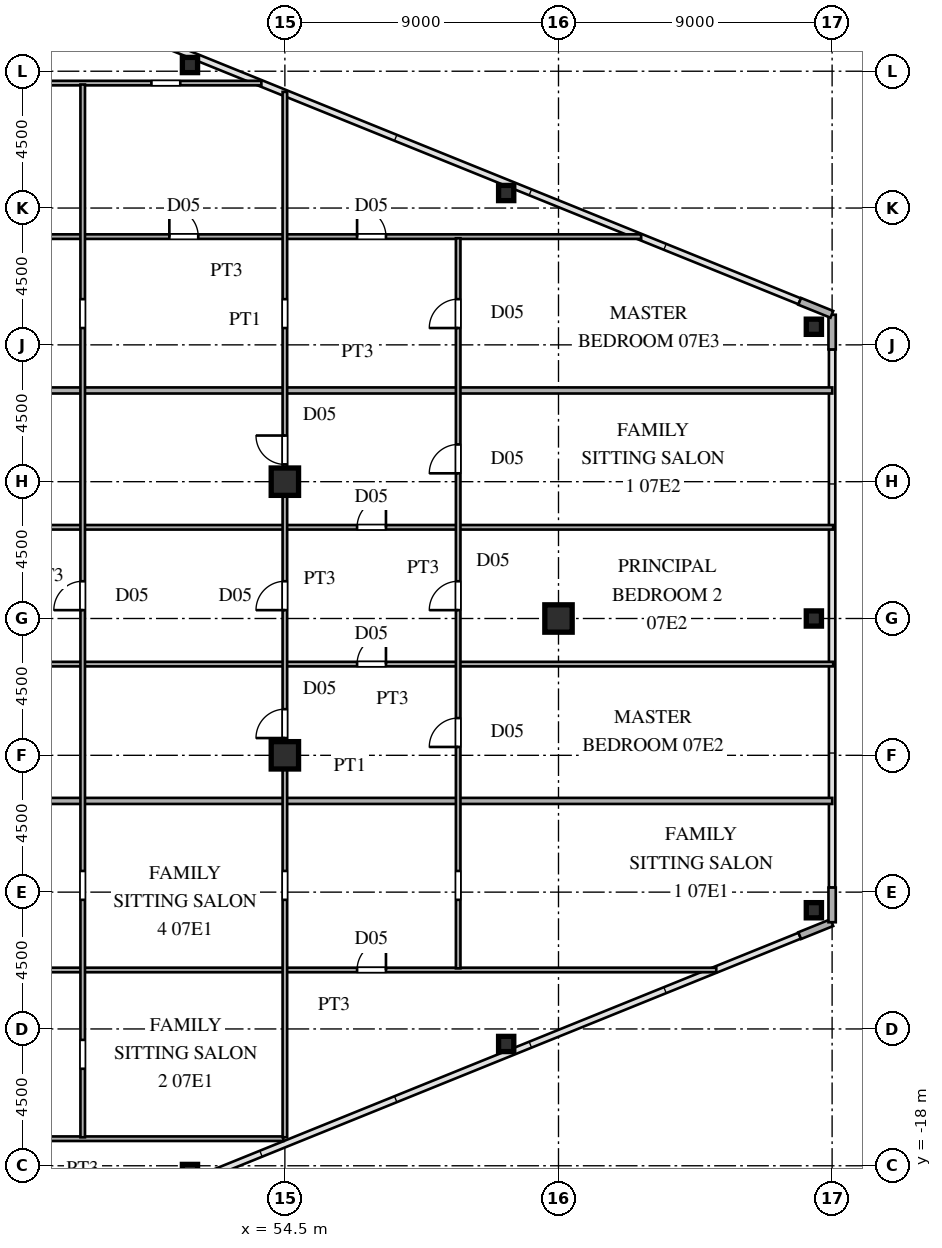
"""IFC4 building model, lengths in metres.
Left out: names, types, materials, properties, quantities, classifications, styles, units other than length and angle.
Written with IfcOpenShell. Run it as: python <this file> out.ifc"""

import sys

from ifc_helpers import new_model, si_unit, direction, frame, frame_2d, origin, origin_2d, place, context, subcontext, project, spatial, rectangle, hollow_rectangle, i_section, extrude, source, transform, mapped, element, fill, save


model = new_model("IFC4")
c1 = context("Model", 3, precision=1e-05, world=origin(), true_north=direction((0.0, 1.0)))
c2 = subcontext(c1, "Body", "Model", "MODEL_VIEW")
j1 = project(units=[si_unit("LENGTHUNIT", "METRE"), si_unit("PLANEANGLEUNIT", "RADIAN")], contexts=[c1])
p1 = place(None, origin())
s1 = spatial("IfcSite", under=j1, at=p1, CompositionType="ELEMENT")
p2 = place(p1, origin())
s2 = spatial("IfcBuilding", under=s1, at=p2, CompositionType="ELEMENT")
p3 = place(p2, frame((0.0, 0.0, 29.7)))
s3 = spatial("IfcBuildingStorey", under=s2, at=p3, CompositionType="ELEMENT", Elevation=29.7)
m1 = source(origin(), c2, "Body", "SweptSolid", [
    extrude(i_section(OverallWidth=0.9, OverallDepth=0.9, WebThickness=0.036, FlangeThickness=0.055, at=origin_2d()), origin(), (0.0, 0.0, 1.0), 3.6),
])
for number, where, z_axis, x_axis in (
    (1, (54.5, -4.5, 0.0), (0.0, 0.0, 1.0), (1.0, 0.0, 0.0)),
    (2, (54.5, 4.5, 0.0), (0.0, 0.0, 1.0), (1.0, 0.0, 0.0)),
    (3, (63.5, 0.0, 0.0), (0.0, 0.0, 1.0), (1.0, 0.0, 0.0)),
):
    element("IfcColumn", number, at=place(p3, frame(where, z_axis=z_axis, x_axis=x_axis)), inside=s3, PredefinedType="COLUMN", context=c2, shape_type="MappedRepresentation", body=[
        mapped(m1, transform((0.0, 0.0, 0.0), scale=1.0)),
    ])
m2 = source(origin(), c2, "Body", "SweptSolid", [
    extrude(hollow_rectangle(XDim=0.5, YDim=0.5, WallThickness=0.02, at=origin_2d()), origin(), (0.0, 0.0, 1.0), 3.6),
])
for number, where, z_axis, x_axis in (
    (4, (71.9, -9.596, 0.0), (0.0, 0.0, 1.0), (1.0, 0.0, 0.0)),
    (5, (71.9, 9.596, 0.0), (0.0, 0.0, 1.0), (1.0, 0.0, 0.0)),
    (6, (51.378, -18.204, 0.0), (0.0, 0.0, 1.0), (1.0, 0.0, 0.0)),
    (7, (61.779, -13.994, 0.0), (0.0, 0.0, 1.0), (1.0, 0.0, 0.0)),
    (8, (51.378, 18.204, 0.0), (0.0, 0.0, 1.0), (1.0, 0.0, 0.0)),
    (9, (61.779, 13.994, 0.0), (0.0, 0.0, 1.0), (1.0, 0.0, 0.0)),
    (10, (71.9, 0.0, 0.0), (0.0, 0.0, 1.0), (1.0, 0.0, 0.0)),
):
    element("IfcColumn", number, at=place(p3, frame(where, z_axis=z_axis, x_axis=x_axis)), inside=s3, PredefinedType="COLUMN", context=c2, shape_type="MappedRepresentation", body=[
        mapped(m2, transform((0.0, 0.0, 0.0), scale=1.0)),
    ])
for number, where, z_axis, x_axis in (
    (11, (71.434, -10.431, 0.0), (0.0, 0.0, 1.0), (0.927, 0.375, 0.0)),
    (12, (72.5, -9.99, 0.0), (0.0, 0.0, 1.0), (0.0, 1.0, 0.0)),
    (13, (72.5, 8.85, 0.0), (0.0, 0.0, 1.0), (0.0, 1.0, 0.0)),
    (14, (72.491, 10.004, 0.0), (0.0, 0.0, 1.0), (-0.927, 0.375, 0.0)),
):
    element("IfcWall", number, at=place(p3, frame(where, z_axis=z_axis, x_axis=x_axis)), inside=s3, PredefinedType="SOLIDWALL", context=c2, shape_type="SweptSolid", body=[
        extrude(rectangle(XDim=1.14, YDim=0.24, at=frame_2d((0.57, 0.0))), origin(), (0.0, 0.0, 1.0), 3.38),
    ])
p4 = place(p3, frame((41.25, -17.11, 0.0), z_axis=(0.0, 0.0, 1.0), x_axis=(1.0, 0.0, 0.0)))
e15 = element("IfcWall", 15, at=p4, inside=s3, PredefinedType="PARTITIONING", context=c2, shape_type="SweptSolid", body=[
    extrude(rectangle(XDim=13.2, YDim=0.15, at=frame_2d((6.6, 0.0))), origin(), (0.0, 0.0, 1.0), 3.38),
])
p5 = place(p4, frame((2.8, 0.0, 0.0)))
e16 = element("IfcOpeningElement", 16, at=p5, cuts=e15, PredefinedType="OPENING", context=c2, shape_type="SweptSolid", body=[
    extrude(rectangle(XDim=0.95, YDim=2.15, at=frame_2d((0.475, 1.075))), frame((0.0, 0.085, 0.0), z_axis=(0.0, -1.0, 0.0), x_axis=(1.0, 0.0, 0.0)), (0.0, 0.0, 1.0), 0.17),
])
p6 = place(p3, frame((41.25, -11.56, 0.0), z_axis=(0.0, 0.0, 1.0), x_axis=(1.0, 0.0, 0.0)))
e17 = element("IfcWall", 17, at=p6, inside=s3, PredefinedType="PARTITIONING", context=c2, shape_type="SweptSolid", body=[
    extrude(rectangle(XDim=27.44, YDim=0.15, at=frame_2d((13.72, 0.0))), origin(), (0.0, 0.0, 1.0), 3.38),
])
p7 = place(p6, frame((2.8, 0.0, 0.0)))
e18 = element("IfcOpeningElement", 18, at=p7, cuts=e17, PredefinedType="OPENING", context=c2, shape_type="SweptSolid", body=[
    extrude(rectangle(XDim=0.95, YDim=2.15, at=frame_2d((0.475, 1.075))), frame((0.0, 0.085, 0.0), z_axis=(0.0, -1.0, 0.0), x_axis=(1.0, 0.0, 0.0)), (0.0, 0.0, 1.0), 0.17),
])
p8 = place(p6, frame((15.625, 0.0, 0.0)))
e19 = element("IfcOpeningElement", 19, at=p8, cuts=e17, PredefinedType="OPENING", context=c2, shape_type="SweptSolid", body=[
    extrude(rectangle(XDim=0.95, YDim=2.15, at=frame_2d((0.475, 1.075))), frame((0.0, 0.085, 0.0), z_axis=(0.0, -1.0, 0.0), x_axis=(1.0, 0.0, 0.0)), (0.0, 0.0, 1.0), 0.17),
])
p9 = place(p3, frame((38.48, -6.0, 0.0), z_axis=(0.0, 0.0, 1.0), x_axis=(1.0, 0.0, 0.0)))
e20 = element("IfcWall", 20, at=p9, inside=s3, PredefinedType="PARTITIONING", context=c2, shape_type="SweptSolid", body=[
    extrude(rectangle(XDim=34.025, YDim=0.2, at=frame_2d((17.012, 0.0))), origin(), (0.0, 0.0, 1.0), 3.38),
])
p10 = place(p3, frame((41.25, -1.5, 0.0), z_axis=(0.0, 0.0, 1.0), x_axis=(1.0, 0.0, 0.0)))
e21 = element("IfcWall", 21, at=p10, inside=s3, PredefinedType="PARTITIONING", context=c2, shape_type="SweptSolid", body=[
    extrude(rectangle(XDim=31.285, YDim=0.15, at=frame_2d((15.643, 0.0))), origin(), (0.0, 0.0, 1.0), 3.38),
])
p11 = place(p10, frame((2.8, 0.0, 0.0)))
e22 = element("IfcOpeningElement", 22, at=p11, cuts=e21, PredefinedType="OPENING", context=c2, shape_type="SweptSolid", body=[
    extrude(rectangle(XDim=0.95, YDim=2.15, at=frame_2d((0.475, 1.075))), frame((0.0, 0.085, 0.0), z_axis=(0.0, -1.0, 0.0), x_axis=(1.0, 0.0, 0.0)), (0.0, 0.0, 1.0), 0.17),
])
p12 = place(p10, frame((15.625, 0.0, 0.0)))
e23 = element("IfcOpeningElement", 23, at=p12, cuts=e21, PredefinedType="OPENING", context=c2, shape_type="SweptSolid", body=[
    extrude(rectangle(XDim=0.95, YDim=2.15, at=frame_2d((0.475, 1.075))), frame((0.0, 0.085, 0.0), z_axis=(0.0, -1.0, 0.0), x_axis=(1.0, 0.0, 0.0)), (0.0, 0.0, 1.0), 0.17),
])
p13 = place(p3, frame((41.25, 3.0, 0.0), z_axis=(0.0, 0.0, 1.0), x_axis=(1.0, 0.0, 0.0)))
e24 = element("IfcWall", 24, at=p13, inside=s3, PredefinedType="PARTITIONING", context=c2, shape_type="SweptSolid", body=[
    extrude(rectangle(XDim=31.285, YDim=0.15, at=frame_2d((15.643, 0.0))), origin(), (0.0, 0.0, 1.0), 3.38),
])
p14 = place(p13, frame((2.8, 0.0, 0.0)))
e25 = element("IfcOpeningElement", 25, at=p14, cuts=e24, PredefinedType="OPENING", context=c2, shape_type="SweptSolid", body=[
    extrude(rectangle(XDim=0.95, YDim=2.15, at=frame_2d((0.475, 1.075))), frame((0.0, 0.085, 0.0), z_axis=(0.0, -1.0, 0.0), x_axis=(1.0, 0.0, 0.0)), (0.0, 0.0, 1.0), 0.17),
])
p15 = place(p13, frame((15.625, 0.0, 0.0)))
e26 = element("IfcOpeningElement", 26, at=p15, cuts=e24, PredefinedType="OPENING", context=c2, shape_type="SweptSolid", body=[
    extrude(rectangle(XDim=0.95, YDim=2.15, at=frame_2d((0.475, 1.075))), frame((0.0, 0.085, 0.0), z_axis=(0.0, -1.0, 0.0), x_axis=(1.0, 0.0, 0.0)), (0.0, 0.0, 1.0), 0.17),
])
p16 = place(p3, frame((38.48, 7.5, 0.0), z_axis=(0.0, 0.0, 1.0), x_axis=(1.0, 0.0, 0.0)))
e27 = element("IfcWall", 27, at=p16, inside=s3, PredefinedType="PARTITIONING", context=c2, shape_type="SweptSolid", body=[
    extrude(rectangle(XDim=34.025, YDim=0.2, at=frame_2d((17.012, 0.0))), origin(), (0.0, 0.0, 1.0), 3.38),
])
p17 = place(p3, frame((41.25, 12.56, 0.0), z_axis=(0.0, 0.0, 1.0), x_axis=(1.0, 0.0, 0.0)))
e28 = element("IfcWall", 28, at=p17, inside=s3, PredefinedType="PARTITIONING", context=c2, shape_type="SweptSolid", body=[
    extrude(rectangle(XDim=24.969, YDim=0.15, at=frame_2d((12.484, 0.0))), origin(), (0.0, 0.0, 1.0), 3.38),
])
p18 = place(p17, frame((2.8, 0.0, 0.0)))
e29 = element("IfcOpeningElement", 29, at=p18, cuts=e28, PredefinedType="OPENING", context=c2, shape_type="SweptSolid", body=[
    extrude(rectangle(XDim=0.95, YDim=2.15, at=frame_2d((0.475, 1.075))), frame((0.0, 0.085, 0.0), z_axis=(0.0, -1.0, 0.0), x_axis=(1.0, 0.0, 0.0)), (0.0, 0.0, 1.0), 0.17),
])
p19 = place(p17, frame((15.625, 0.0, 0.0)))
e30 = element("IfcOpeningElement", 30, at=p19, cuts=e28, PredefinedType="OPENING", context=c2, shape_type="SweptSolid", body=[
    extrude(rectangle(XDim=0.95, YDim=2.15, at=frame_2d((0.475, 1.075))), frame((0.0, 0.085, 0.0), z_axis=(0.0, -1.0, 0.0), x_axis=(1.0, 0.0, 0.0)), (0.0, 0.0, 1.0), 0.17),
])
p20 = place(p17, frame((9.45, 0.0, 0.0)))
e31 = element("IfcOpeningElement", 31, at=p20, cuts=e28, PredefinedType="OPENING", context=c2, shape_type="SweptSolid", body=[
    extrude(rectangle(XDim=0.95, YDim=2.15, at=frame_2d((0.475, 1.075))), frame((0.0, 0.085, 0.0), z_axis=(0.0, -1.0, 0.0), x_axis=(1.0, 0.0, 0.0)), (0.0, 0.0, 1.0), 0.17),
])
p21 = place(p3, frame((41.25, 17.61, 0.0), z_axis=(0.0, 0.0, 1.0), x_axis=(1.0, 0.0, 0.0)))
e32 = element("IfcWall", 32, at=p21, inside=s3, PredefinedType="PARTITIONING", context=c2, shape_type="SweptSolid", body=[
    extrude(rectangle(XDim=12.477, YDim=0.15, at=frame_2d((6.239, 0.0))), origin(), (0.0, 0.0, 1.0), 3.38),
])
p22 = place(p21, frame((8.86, 0.0, 0.0)))
e33 = element("IfcOpeningElement", 33, at=p22, cuts=e32, PredefinedType="OPENING", context=c2, shape_type="SweptSolid", body=[
    extrude(rectangle(XDim=0.95, YDim=2.15, at=frame_2d((0.475, 1.075))), frame((0.0, 0.085, 0.0), z_axis=(0.0, -1.0, 0.0), x_axis=(1.0, 0.0, 0.0)), (0.0, 0.0, 1.0), 0.17),
])
p23 = place(p3, frame((47.85, -17.063, 0.0), z_axis=(0.0, 0.0, 1.0), x_axis=(0.0, 1.0, 0.0)))
e34 = element("IfcWall", 34, at=p23, inside=s3, PredefinedType="PARTITIONING", context=c2, shape_type="SweptSolid", body=[
    extrude(rectangle(XDim=34.626, YDim=0.15, at=frame_2d((17.313, 0.0))), origin(), (0.0, 0.0, 1.0), 3.38),
])
p24 = place(p23, frame((7.81, 0.0, 0.0)))
e35 = element("IfcOpeningElement", 35, at=p24, cuts=e34, PredefinedType="OPENING", context=c2, shape_type="SweptSolid", body=[
    extrude(rectangle(XDim=0.95, YDim=2.15, at=frame_2d((0.475, 1.075))), frame((0.0, 0.085, 0.0), z_axis=(0.0, -1.0, 0.0), x_axis=(1.0, 0.0, 0.0)), (0.0, 0.0, 1.0), 0.17),
])
p25 = place(p23, frame((2.253, 0.0, 0.0)))
e36 = element("IfcOpeningElement", 36, at=p25, cuts=e34, PredefinedType="OPENING", context=c2, shape_type="SweptSolid", body=[
    extrude(rectangle(XDim=0.95, YDim=2.15, at=frame_2d((0.475, 1.075))), frame((0.0, 0.085, 0.0), z_axis=(0.0, -1.0, 0.0), x_axis=(1.0, 0.0, 0.0)), (0.0, 0.0, 1.0), 0.17),
])
p26 = place(p23, frame((17.338, 0.0, 0.0)))
e37 = element("IfcOpeningElement", 37, at=p26, cuts=e34, PredefinedType="OPENING", context=c2, shape_type="SweptSolid", body=[
    extrude(rectangle(XDim=0.95, YDim=2.15, at=frame_2d((0.475, 1.075))), frame((0.0, 0.085, 0.0), z_axis=(0.0, -1.0, 0.0), x_axis=(1.0, 0.0, 0.0)), (0.0, 0.0, 1.0), 0.17),
])
p27 = place(p23, frame((26.616, 0.0, 0.0)))
e38 = element("IfcOpeningElement", 38, at=p27, cuts=e34, PredefinedType="OPENING", context=c2, shape_type="SweptSolid", body=[
    extrude(rectangle(XDim=0.95, YDim=2.15, at=frame_2d((0.475, 1.075))), frame((0.0, 0.085, 0.0), z_axis=(0.0, -1.0, 0.0), x_axis=(1.0, 0.0, 0.0)), (0.0, 0.0, 1.0), 0.17),
])
p28 = place(p3, frame((54.5, -17.063, 0.0), z_axis=(0.0, 0.0, 1.0), x_axis=(0.0, 1.0, 0.0)))
e39 = element("IfcWall", 39, at=p28, inside=s3, PredefinedType="PARTITIONING", context=c2, shape_type="SweptSolid", body=[
    extrude(rectangle(XDim=34.384, YDim=0.15, at=frame_2d((17.192, 0.0))), origin(), (0.0, 0.0, 1.0), 2.68),
])
p29 = place(p28, frame((7.81, 0.0, 0.0)))
e40 = element("IfcOpeningElement", 40, at=p29, cuts=e39, PredefinedType="OPENING", context=c2, shape_type="SweptSolid", body=[
    extrude(rectangle(XDim=0.95, YDim=2.15, at=frame_2d((0.475, 1.075))), frame((0.0, 0.085, 0.0), z_axis=(0.0, -1.0, 0.0), x_axis=(1.0, 0.0, 0.0)), (0.0, 0.0, 1.0), 0.17),
])
p30 = place(p28, frame((17.338, 0.0, 0.0)))
e41 = element("IfcOpeningElement", 41, at=p30, cuts=e39, PredefinedType="OPENING", context=c2, shape_type="SweptSolid", body=[
    extrude(rectangle(XDim=0.95, YDim=2.15, at=frame_2d((0.475, 1.075))), frame((0.0, 0.085, 0.0), z_axis=(0.0, -1.0, 0.0), x_axis=(1.0, 0.0, 0.0)), (0.0, 0.0, 1.0), 0.17),
])
p31 = place(p28, frame((13.131, 0.0, 0.0)))
e42 = element("IfcOpeningElement", 42, at=p31, cuts=e39, PredefinedType="OPENING", context=c2, shape_type="SweptSolid", body=[
    extrude(rectangle(XDim=0.95, YDim=2.15, at=frame_2d((0.475, 1.075))), frame((0.0, 0.085, 0.0), z_axis=(0.0, -1.0, 0.0), x_axis=(1.0, 0.0, 0.0)), (0.0, 0.0, 1.0), 0.17),
])
p32 = place(p28, frame((22.131, 0.0, 0.0)))
e43 = element("IfcOpeningElement", 43, at=p32, cuts=e39, PredefinedType="OPENING", context=c2, shape_type="SweptSolid", body=[
    extrude(rectangle(XDim=0.95, YDim=2.15, at=frame_2d((0.475, 1.075))), frame((0.0, 0.085, 0.0), z_axis=(0.0, -1.0, 0.0), x_axis=(1.0, 0.0, 0.0)), (0.0, 0.0, 1.0), 0.17),
])
p33 = place(p28, frame((26.616, 0.0, 0.0)))
e44 = element("IfcOpeningElement", 44, at=p33, cuts=e39, PredefinedType="OPENING", context=c2, shape_type="SweptSolid", body=[
    extrude(rectangle(XDim=0.95, YDim=2.15, at=frame_2d((0.475, 1.075))), frame((0.0, 0.085, 0.0), z_axis=(0.0, -1.0, 0.0), x_axis=(1.0, 0.0, 0.0)), (0.0, 0.0, 1.0), 0.17),
])
p34 = place(p3, frame((60.2, -11.506, 0.0), z_axis=(0.0, 0.0, 1.0), x_axis=(0.0, 1.0, 0.0)))
e45 = element("IfcWall", 45, at=p34, inside=s3, PredefinedType="PARTITIONING", context=c2, shape_type="SweptSolid", body=[
    extrude(rectangle(XDim=24.012, YDim=0.15, at=frame_2d((12.006, 0.0))), origin(), (0.0, 0.0, 1.0), 3.38),
])
p35 = place(p34, frame((2.253, 0.0, 0.0)))
e46 = element("IfcOpeningElement", 46, at=p35, cuts=e45, PredefinedType="OPENING", context=c2, shape_type="SweptSolid", body=[
    extrude(rectangle(XDim=0.95, YDim=2.15, at=frame_2d((0.475, 1.075))), frame((0.0, 0.085, 0.0), z_axis=(0.0, -1.0, 0.0), x_axis=(1.0, 0.0, 0.0)), (0.0, 0.0, 1.0), 0.17),
])
p36 = place(p34, frame((7.281, 0.0, 0.0)))
e47 = element("IfcOpeningElement", 47, at=p36, cuts=e45, PredefinedType="OPENING", context=c2, shape_type="SweptSolid", body=[
    extrude(rectangle(XDim=0.95, YDim=2.15, at=frame_2d((0.475, 1.075))), frame((0.0, 0.085, 0.0), z_axis=(0.0, -1.0, 0.0), x_axis=(1.0, 0.0, 0.0)), (0.0, 0.0, 1.0), 0.17),
])
p37 = place(p34, frame((11.781, 0.0, 0.0)))
e48 = element("IfcOpeningElement", 48, at=p37, cuts=e45, PredefinedType="OPENING", context=c2, shape_type="SweptSolid", body=[
    extrude(rectangle(XDim=0.95, YDim=2.15, at=frame_2d((0.475, 1.075))), frame((0.0, 0.085, 0.0), z_axis=(0.0, -1.0, 0.0), x_axis=(1.0, 0.0, 0.0)), (0.0, 0.0, 1.0), 0.17),
])
p38 = place(p34, frame((16.281, 0.0, 0.0)))
e49 = element("IfcOpeningElement", 49, at=p38, cuts=e45, PredefinedType="OPENING", context=c2, shape_type="SweptSolid", body=[
    extrude(rectangle(XDim=0.95, YDim=2.15, at=frame_2d((0.475, 1.075))), frame((0.0, 0.085, 0.0), z_axis=(0.0, -1.0, 0.0), x_axis=(1.0, 0.0, 0.0)), (0.0, 0.0, 1.0), 0.17),
])
p39 = place(p34, frame((21.059, 0.0, 0.0)))
e50 = element("IfcOpeningElement", 50, at=p39, cuts=e45, PredefinedType="OPENING", context=c2, shape_type="SweptSolid", body=[
    extrude(rectangle(XDim=0.95, YDim=2.15, at=frame_2d((0.475, 1.075))), frame((0.0, 0.085, 0.0), z_axis=(0.0, -1.0, 0.0), x_axis=(1.0, 0.0, 0.0)), (0.0, 0.0, 1.0), 0.17),
])
m3 = source(origin(), c2, "Body", "SweptSolid", [
    extrude(rectangle(XDim=0.95, YDim=2.15, at=frame_2d((0.475, 1.075))), frame((0.0, 0.025, 0.0), z_axis=(0.0, -1.0, 0.0), x_axis=(1.0, 0.0, 0.0)), (0.0, 0.0, 1.0), 0.05),
])
p40 = place(p8, origin())
e51 = element("IfcDoor", 51, at=p40, inside=s3, OperationType="SINGLE_SWING_RIGHT", PredefinedType="DOOR", context=c2, shape_type="MappedRepresentation", body=[
    mapped(m3, transform((0.0, 0.0, 0.0), scale=1.0)),
])
fill(e19, e51)
p41 = place(p12, origin())
e52 = element("IfcDoor", 52, at=p41, inside=s3, OperationType="SINGLE_SWING_RIGHT", PredefinedType="DOOR", context=c2, shape_type="MappedRepresentation", body=[
    mapped(m3, transform((0.0, 0.0, 0.0), scale=1.0)),
])
fill(e23, e52)
p42 = place(p15, origin())
e53 = element("IfcDoor", 53, at=p42, inside=s3, OperationType="SINGLE_SWING_RIGHT", PredefinedType="DOOR", context=c2, shape_type="MappedRepresentation", body=[
    mapped(m3, transform((0.0, 0.0, 0.0), scale=1.0)),
])
fill(e26, e53)
p43 = place(p19, origin())
e54 = element("IfcDoor", 54, at=p43, inside=s3, OperationType="SINGLE_SWING_LEFT", PredefinedType="DOOR", context=c2, shape_type="MappedRepresentation", body=[
    mapped(m3, transform((0.0, 0.0, 0.0), scale=1.0)),
])
fill(e30, e54)
p44 = place(p20, origin())
e55 = element("IfcDoor", 55, at=p44, inside=s3, OperationType="SINGLE_SWING_LEFT", PredefinedType="DOOR", context=c2, shape_type="MappedRepresentation", body=[
    mapped(m3, transform((0.0, 0.0, 0.0), scale=1.0)),
])
fill(e31, e55)
p45 = place(p26, origin())
e56 = element("IfcDoor", 56, at=p45, inside=s3, OperationType="SINGLE_SWING_LEFT", PredefinedType="DOOR", context=c2, shape_type="MappedRepresentation", body=[
    mapped(m3, transform((0.0, 0.0, 0.0), scale=1.0)),
])
fill(e37, e56)
p46 = place(p30, origin())
e57 = element("IfcDoor", 57, at=p46, inside=s3, OperationType="SINGLE_SWING_LEFT", PredefinedType="DOOR", context=c2, shape_type="MappedRepresentation", body=[
    mapped(m3, transform((0.0, 0.0, 0.0), scale=1.0)),
])
fill(e41, e57)
p47 = place(p31, origin())
e58 = element("IfcDoor", 58, at=p47, inside=s3, OperationType="SINGLE_SWING_LEFT", PredefinedType="DOOR", context=c2, shape_type="MappedRepresentation", body=[
    mapped(m3, transform((0.0, 0.0, 0.0), scale=1.0)),
])
fill(e42, e58)
p48 = place(p32, origin())
e59 = element("IfcDoor", 59, at=p48, inside=s3, OperationType="SINGLE_SWING_RIGHT", PredefinedType="DOOR", context=c2, shape_type="MappedRepresentation", body=[
    mapped(m3, transform((0.0, 0.0, 0.0), scale=1.0)),
])
fill(e43, e59)
p49 = place(p36, origin())
e60 = element("IfcDoor", 60, at=p49, inside=s3, OperationType="SINGLE_SWING_LEFT", PredefinedType="DOOR", context=c2, shape_type="MappedRepresentation", body=[
    mapped(m3, transform((0.0, 0.0, 0.0), scale=1.0)),
])
fill(e47, e60)
p50 = place(p37, origin())
e61 = element("IfcDoor", 61, at=p50, inside=s3, OperationType="SINGLE_SWING_LEFT", PredefinedType="DOOR", context=c2, shape_type="MappedRepresentation", body=[
    mapped(m3, transform((0.0, 0.0, 0.0), scale=1.0)),
])
fill(e48, e61)
p51 = place(p38, origin())
e62 = element("IfcDoor", 62, at=p51, inside=s3, OperationType="SINGLE_SWING_LEFT", PredefinedType="DOOR", context=c2, shape_type="MappedRepresentation", body=[
    mapped(m3, transform((0.0, 0.0, 0.0), scale=1.0)),
])
fill(e49, e62)
p52 = place(p39, origin())
e63 = element("IfcDoor", 63, at=p52, inside=s3, OperationType="SINGLE_SWING_LEFT", PredefinedType="DOOR", context=c2, shape_type="MappedRepresentation", body=[
    mapped(m3, transform((0.0, 0.0, 0.0), scale=1.0)),
])
fill(e50, e63)
save(model, sys.argv[1])
